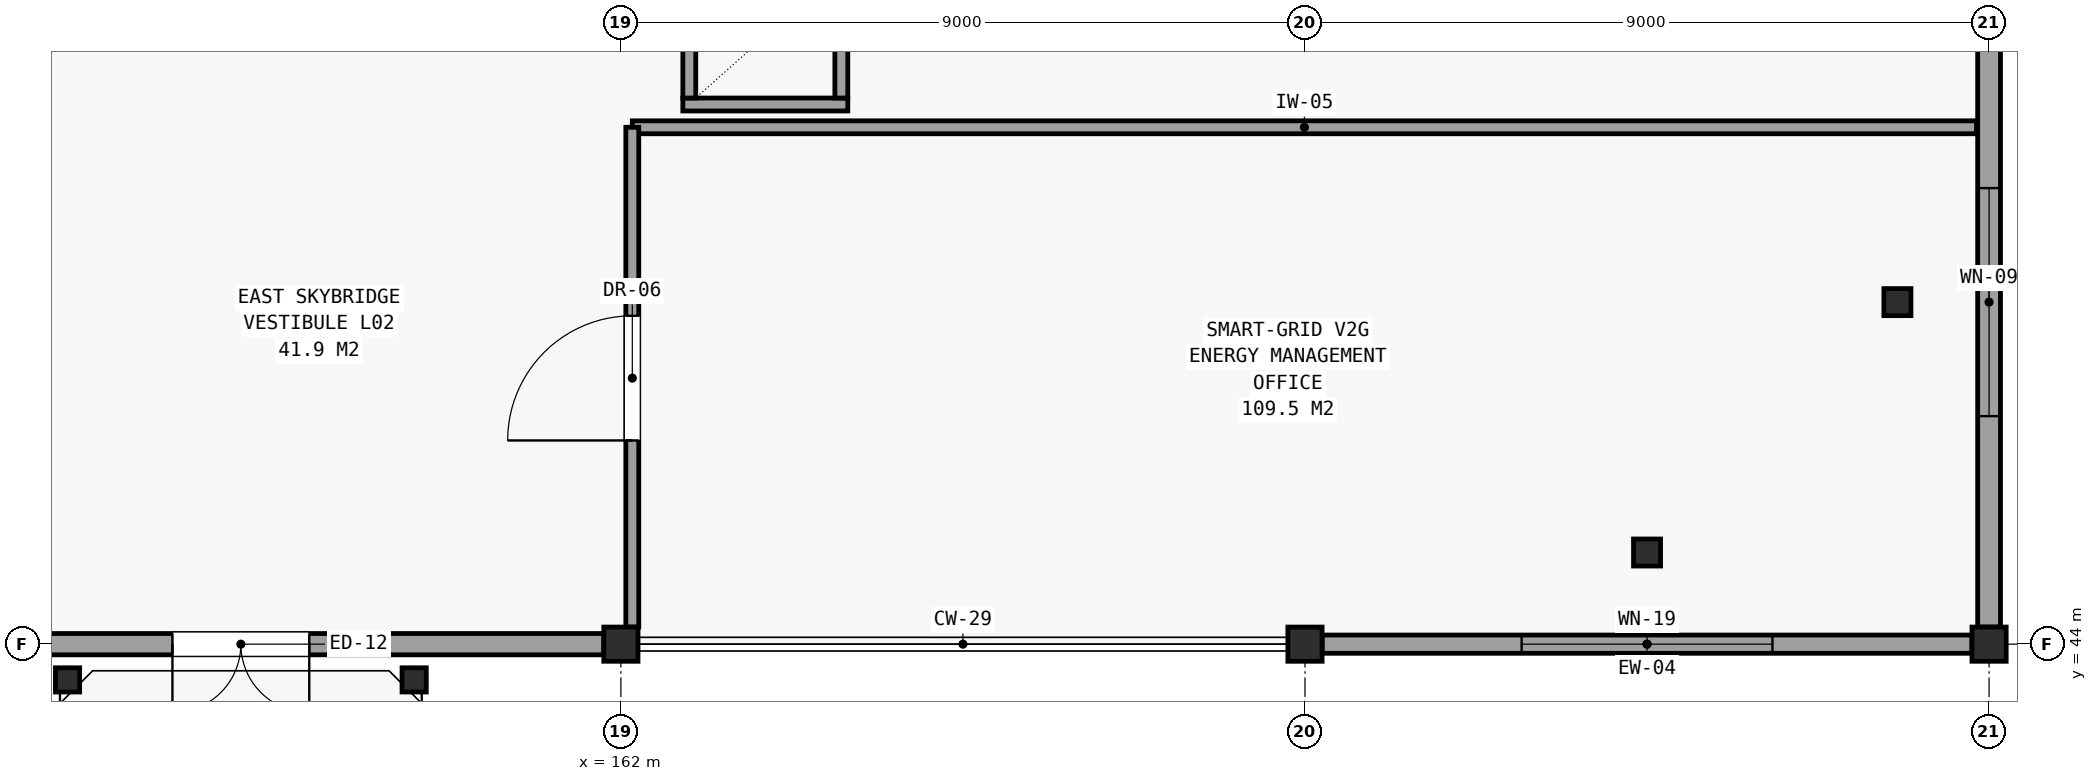
"""IFC4 building model, lengths in metres.
Left out: names, types, materials, properties, quantities, classifications, styles, units other than length and angle.
Written with IfcOpenShell. Run it as: python <this file> out.ifc"""

import sys

from ifc_helpers import new_model, si_unit, direction, frame, frame_2d, origin, origin_2d, place, context, subcontext, project, spatial, rectangle, hollow_rectangle, hollow_circle, extrude, element, fill, save


model = new_model("IFC4")
c1 = context("Model", 3, precision=1e-05, world=origin(), true_north=direction((0.0, 1.0)))
c2 = subcontext(c1, "Body", "Model", "MODEL_VIEW")
j1 = project(units=[si_unit("LENGTHUNIT", "METRE"), si_unit("PLANEANGLEUNIT", "RADIAN")], contexts=[c1])
p1 = place(None, origin())
s1 = spatial("IfcSite", under=j1, at=p1, CompositionType="ELEMENT")
p2 = place(p1, origin())
s2 = spatial("IfcBuilding", under=s1, at=p2, CompositionType="ELEMENT")
p3 = place(p2, frame((0.0, 0.0, 9.3)))
s3 = spatial("IfcBuildingStorey", under=s2, at=p3, CompositionType="ELEMENT", Elevation=9.3)
for number, where, z_axis, x_axis in (
    (1, (154.72, 43.53, 0.0), (0.0, 0.0, 1.0), (1.0, 0.0, 0.0)),
    (2, (159.28, 43.53, 0.0), (0.0, 0.0, 1.0), (1.0, 0.0, 0.0)),
):
    element("IfcColumn", number, at=place(p3, frame(where, z_axis=z_axis, x_axis=x_axis)), inside=s3, PredefinedType="COLUMN", context=c2, shape_type="SweptSolid", body=[
        extrude(hollow_circle(Radius=0.159, WallThickness=0.01, at=origin_2d()), origin(), (0.0, 0.0, 1.0), 4.2),
    ])
for number, where, z_axis, x_axis in (
    (3, (162.0, 44.0, 0.0), (0.0, 0.0, 1.0), (1.0, 0.0, 0.0)),
    (4, (171.0, 44.0, 0.0), (0.0, 0.0, 1.0), (1.0, 0.0, 0.0)),
):
    element("IfcColumn", number, at=place(p3, frame(where, z_axis=z_axis, x_axis=x_axis)), inside=s3, PredefinedType="COLUMN", context=c2, shape_type="SweptSolid", body=[
        extrude(hollow_rectangle(XDim=0.45, YDim=0.45, WallThickness=0.022, at=origin_2d()), origin(), (0.0, 0.0, 1.0), 4.2),
    ])
for number, where, z_axis, x_axis in (
    (5, (175.5, 45.206, 0.0), (0.0, 0.0, 1.0), (1.0, 0.0, 0.0)),
    (6, (178.794, 48.5, 0.0), (0.0, 0.0, 1.0), (1.0, 0.0, 0.0)),
):
    element("IfcColumn", number, at=place(p3, frame(where, z_axis=z_axis, x_axis=x_axis)), inside=s3, PredefinedType="COLUMN", context=c2, shape_type="SweptSolid", body=[
        extrude(hollow_circle(Radius=0.178, WallThickness=0.013, at=origin_2d()), origin(), (0.0, 0.0, 1.0), 4.2),
    ])
p4 = place(p3, frame((180.0, 44.0, 0.0), z_axis=(0.0, 0.0, 1.0), x_axis=(1.0, 0.0, 0.0)))
e7 = element("IfcColumn", 7, at=p4, inside=s3, PredefinedType="COLUMN", context=c2, shape_type="SweptSolid", body=[
    extrude(hollow_rectangle(XDim=0.45, YDim=0.45, WallThickness=0.022, at=origin_2d()), origin(), (0.0, 0.0, 1.0), 4.2),
])
p5 = place(p3, frame((153.225, 44.0, 0.0), z_axis=(0.0, 0.0, 1.0), x_axis=(1.0, 0.0, 0.0)))
e8 = element("IfcWall", 8, at=p5, inside=s3, PredefinedType="SOLIDWALL", context=c2, shape_type="SweptSolid", body=[
    extrude(rectangle(XDim=8.55, YDim=0.28, at=frame_2d((4.275, 0.0))), origin(), (0.0, 0.0, 1.0), 3.362),
])
p6 = place(p5, frame((4.675, 0.0, 0.0), z_axis=(0.0, 0.0, 1.0), x_axis=(-1.0, 0.0, 0.0)))
e9 = element("IfcOpeningElement", 9, at=p6, cuts=e8, PredefinedType="OPENING", context=c2, shape_type="SweptSolid", body=[
    extrude(rectangle(XDim=1.8, YDim=2.2, at=frame_2d((0.9, 1.1))), frame((0.0, 0.151, 0.0), z_axis=(0.0, -1.0, 0.0), x_axis=(1.0, 0.0, 0.0)), (0.0, 0.0, 1.0), 0.302),
])
p7 = place(p3, frame((171.225, 44.0, 0.0), z_axis=(0.0, 0.0, 1.0), x_axis=(1.0, 0.0, 0.0)))
e10 = element("IfcWall", 10, at=p7, inside=s3, PredefinedType="SOLIDWALL", context=c2, shape_type="SweptSolid", body=[
    extrude(rectangle(XDim=8.55, YDim=0.24, at=frame_2d((4.275, 0.0))), origin(), (0.0, 0.0, 1.0), 3.362),
])
p8 = place(p7, frame((2.625, 0.0, 0.95)))
e11 = element("IfcOpeningElement", 11, at=p8, cuts=e10, PredefinedType="OPENING", context=c2, shape_type="SweptSolid", body=[
    extrude(rectangle(XDim=3.3, YDim=1.4, at=frame_2d((1.65, 0.7))), frame((0.0, 0.131, 0.0), z_axis=(0.0, -1.0, 0.0), x_axis=(1.0, 0.0, 0.0)), (0.0, 0.0, 1.0), 0.262),
])
p9 = place(p3, frame((180.0, 44.225, 0.0), z_axis=(0.0, 0.0, 1.0), x_axis=(0.0, 1.0, 0.0)))
e12 = element("IfcWall", 12, at=p9, inside=s3, PredefinedType="SOLIDWALL", context=c2, shape_type="SweptSolid", body=[
    extrude(rectangle(XDim=8.55, YDim=0.3, at=frame_2d((4.275, 0.0))), origin(), (0.0, 0.0, 1.0), 3.3),
])
p10 = place(p9, frame((2.775, 0.0, 0.95)))
e13 = element("IfcOpeningElement", 13, at=p10, cuts=e12, PredefinedType="OPENING", context=c2, shape_type="SweptSolid", body=[
    extrude(rectangle(XDim=3.0, YDim=1.4, at=frame_2d((1.5, 0.7))), frame((0.0, 0.161, 0.0), z_axis=(0.0, -1.0, 0.0), x_axis=(1.0, 0.0, 0.0)), (0.0, 0.0, 1.0), 0.322),
])
p11 = place(p3, frame((162.815, 51.1, 0.0), z_axis=(0.0, 0.0, 1.0), x_axis=(1.0, 0.0, 0.0)))
e14 = element("IfcWall", 14, at=p11, inside=s3, PredefinedType="PARTITIONING", context=c2, shape_type="SweptSolid", body=[
    extrude(rectangle(XDim=2.17, YDim=0.17, at=frame_2d((1.085, 0.0))), origin(), (0.0, 0.0, 1.0), 3.92),
])
for number, where, z_axis, x_axis in (
    (15, (162.9, 51.185, 0.0), (0.0, 0.0, 1.0), (0.0, 1.0, 0.0)),
    (16, (164.9, 51.185, 0.0), (0.0, 0.0, 1.0), (0.0, 1.0, 0.0)),
):
    element("IfcWall", number, at=place(p3, frame(where, z_axis=z_axis, x_axis=x_axis)), inside=s3, PredefinedType="PARTITIONING", context=c2, shape_type="SweptSolid", body=[
        extrude(rectangle(XDim=1.63, YDim=0.17, at=frame_2d((0.815, 0.0))), origin(), (0.0, 0.0, 1.0), 3.362),
    ])
p12 = place(p3, frame((162.15, 50.8, 0.0), z_axis=(0.0, 0.0, 1.0), x_axis=(1.0, 0.0, 0.0)))
e17 = element("IfcWall", 17, at=p12, inside=s3, PredefinedType="PARTITIONING", context=c2, shape_type="SweptSolid", body=[
    extrude(rectangle(XDim=17.685, YDim=0.17, at=frame_2d((8.843, 0.0))), origin(), (0.0, 0.0, 1.0), 3.3),
])
p13 = place(p3, frame((162.15, 44.225, 0.0), z_axis=(0.0, 0.0, 1.0), x_axis=(0.0, 1.0, 0.0)))
e18 = element("IfcWall", 18, at=p13, inside=s3, PredefinedType="PARTITIONING", context=c2, shape_type="SweptSolid", body=[
    extrude(rectangle(XDim=6.575, YDim=0.17, at=frame_2d((3.288, 0.0))), origin(), (0.0, 0.0, 1.0), 3.3),
])
p14 = place(p13, frame((2.455, 0.0, 0.0)))
e19 = element("IfcOpeningElement", 19, at=p14, cuts=e18, PredefinedType="OPENING", context=c2, shape_type="SweptSolid", body=[
    extrude(rectangle(XDim=1.64, YDim=2.4, at=frame_2d((0.82, 1.2))), frame((0.0, 0.096, 0.0), z_axis=(0.0, -1.0, 0.0), x_axis=(1.0, 0.0, 0.0)), (0.0, 0.0, 1.0), 0.192),
])
p15 = place(p6, origin())
e20 = element("IfcDoor", 20, at=p15, inside=s3, OperationType="SINGLE_SWING_LEFT", PredefinedType="DOOR", context=c2, shape_type="SweptSolid", body=[
    extrude(rectangle(XDim=1.8, YDim=2.2, at=frame_2d((0.9, 1.1))), frame((0.0, 0.025, 0.0), z_axis=(0.0, -1.0, 0.0), x_axis=(1.0, 0.0, 0.0)), (0.0, 0.0, 1.0), 0.05),
])
fill(e9, e20)
p16 = place(p8, origin())
e21 = element("IfcWindow", 21, at=p16, inside=s3, PartitioningType="SINGLE_PANEL", PredefinedType="WINDOW", context=c2, shape_type="SweptSolid", body=[
    extrude(rectangle(XDim=3.3, YDim=1.4, at=frame_2d((1.65, 0.7))), frame((0.0, 0.03, 0.0), z_axis=(0.0, -1.0, 0.0), x_axis=(1.0, 0.0, 0.0)), (0.0, 0.0, 1.0), 0.06),
])
fill(e11, e21)
p17 = place(p10, origin())
e22 = element("IfcWindow", 22, at=p17, inside=s3, PartitioningType="SINGLE_PANEL", PredefinedType="WINDOW", context=c2, shape_type="SweptSolid", body=[
    extrude(rectangle(XDim=3.0, YDim=1.4, at=frame_2d((1.5, 0.7))), frame((0.0, 0.03, 0.0), z_axis=(0.0, -1.0, 0.0), x_axis=(1.0, 0.0, 0.0)), (0.0, 0.0, 1.0), 0.06),
])
fill(e13, e22)
p18 = place(p14, origin())
e23 = element("IfcDoor", 23, at=p18, inside=s3, OperationType="SINGLE_SWING_LEFT", PredefinedType="DOOR", context=c2, shape_type="SweptSolid", body=[
    extrude(rectangle(XDim=1.64, YDim=2.4, at=frame_2d((0.82, 1.2))), frame((0.0, 0.025, 0.0), z_axis=(0.0, -1.0, 0.0), x_axis=(1.0, 0.0, 0.0)), (0.0, 0.0, 1.0), 0.05),
])
fill(e19, e23)
save(model, sys.argv[1])
